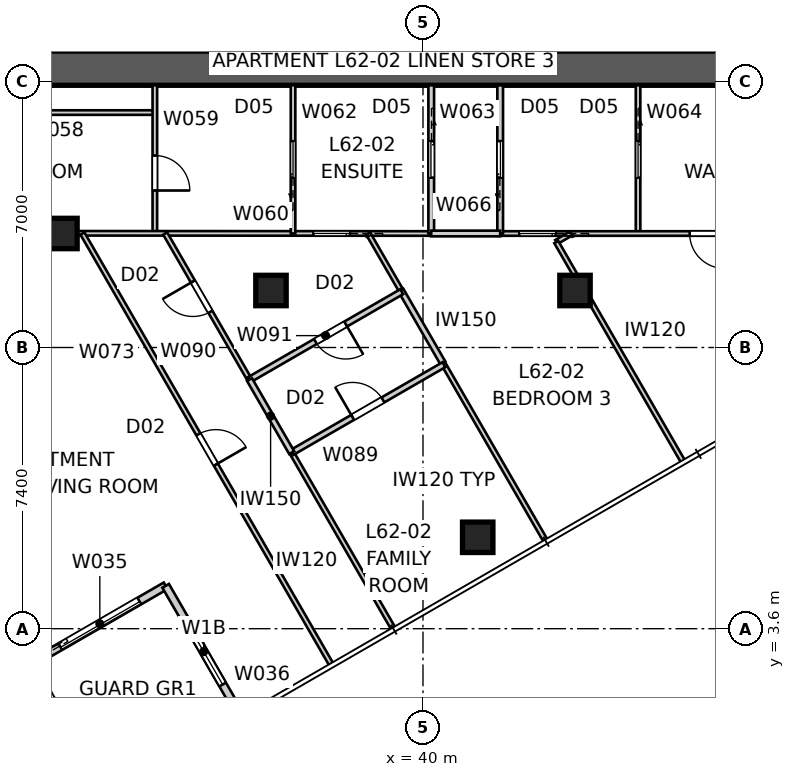
"""IFC4 building model, lengths in metres.
Left out: names, types, materials, properties, quantities, classifications, styles, units other than length and angle.
Written with IfcOpenShell. Run it as: python <this file> out.ifc"""

import sys

from ifc_helpers import new_model, si_unit, direction, frame, frame_2d, origin, origin_2d, place, context, subcontext, project, spatial, polyline, rectangle, outline, extrude, element, fill, save


model = new_model("IFC4")
c1 = context("Model", 3, precision=1e-05, world=origin(), true_north=direction((0.0, 1.0)))
c2 = subcontext(c1, "Body", "Model", "MODEL_VIEW")
j1 = project(units=[si_unit("LENGTHUNIT", "METRE"), si_unit("PLANEANGLEUNIT", "RADIAN")], contexts=[c1])
p1 = place(None, origin())
s1 = spatial("IfcSite", under=j1, at=p1, CompositionType="ELEMENT")
p2 = place(p1, origin())
s2 = spatial("IfcBuilding", under=s1, at=p2, CompositionType="ELEMENT")
p3 = place(p2, frame((0.0, 0.0, 225.2)))
s3 = spatial("IfcBuildingStorey", under=s2, at=p3, CompositionType="ELEMENT", Elevation=225.2)
p4 = place(p3, frame((51.2, 18.35, 0.0), z_axis=(0.0, 0.0, 1.0), x_axis=(-1.0, 0.0, 0.0)))
e1 = element("IfcWall", 1, at=p4, inside=s3, PredefinedType="SHEAR", context=c2, shape_type="SweptSolid", body=[
    extrude(outline(polyline([(0.0, -0.45), (22.4, -0.45), (22.4, -0.025), (22.85, -0.025), (22.85, 0.025), (22.4, 0.025), (22.4, 0.45), (0.0, 0.45), (0.0, 0.025), (-0.45, 0.025), (-0.45, -0.025), (0.0, -0.025), (0.0, -0.45)])), origin(), (0.0, 0.0, 1.0), 3.4),
])
for number, where, z_axis, x_axis in (
    (2, (41.44, 6.005, 0.0), (0.0, 0.0, 1.0), (1.0, 0.0, 0.0)),
    (3, (30.5, 14.0, 0.0), (0.0, 0.0, 1.0), (1.0, 0.0, 0.0)),
    (4, (36.0, 12.5, 0.0), (0.0, 0.0, 1.0), (1.0, 0.0, 0.0)),
    (5, (44.0, 12.5, 0.0), (0.0, 0.0, 1.0), (1.0, 0.0, 0.0)),
):
    element("IfcColumn", number, at=place(p3, frame(where, z_axis=z_axis, x_axis=x_axis)), inside=s3, PredefinedType="COLUMN", context=c2, shape_type="SweptSolid", body=[
        extrude(rectangle(XDim=0.8, YDim=0.8, at=origin_2d()), origin(), (0.0, 0.0, 1.0), 3.4),
    ])
p5 = place(p3, frame((29.764, 2.729, 0.0), z_axis=(0.0, 0.0, 1.0), x_axis=(0.866026010844, 0.49999894854, 0.0)))
e6 = element("IfcWall", 6, at=p5, inside=s3, PredefinedType="SOLIDWALL", context=c2, shape_type="SweptSolid", body=[
    extrude(rectangle(XDim=4.0, YDim=0.2, at=frame_2d((2.0, 0.0))), origin(), (0.0, 0.0, 1.0), 3.25),
])
p6 = place(p5, frame((0.8, 0.0, 0.0)))
e7 = element("IfcOpeningElement", 7, at=p6, cuts=e6, PredefinedType="OPENING", context=c2, shape_type="SweptSolid", body=[
    extrude(rectangle(XDim=2.4, YDim=2.1, at=frame_2d((1.2, 1.05))), frame((0.0, 0.11, 0.0), z_axis=(0.0, -1.0, 0.0), x_axis=(1.0, 0.0, 0.0)), (0.0, 0.0, 1.0), 0.22),
])
p7 = place(p3, frame((33.229, 4.729, 0.0), z_axis=(0.0, 0.0, 1.0), x_axis=(0.49999894854, -0.866026010844, 0.0)))
e8 = element("IfcWall", 8, at=p7, inside=s3, PredefinedType="SOLIDWALL", context=c2, shape_type="SweptSolid", body=[
    extrude(rectangle(XDim=4.0, YDim=0.2, at=frame_2d((2.0, 0.0))), origin(), (0.0, 0.0, 1.0), 3.25),
])
p8 = place(p7, frame((1.0, 0.0, 0.45)))
e9 = element("IfcOpeningElement", 9, at=p8, cuts=e8, PredefinedType="OPENING", context=c2, shape_type="SweptSolid", body=[
    extrude(rectangle(XDim=2.0, YDim=1.8, at=frame_2d((1.0, 0.9))), frame((0.0, 0.11, 0.0), z_axis=(0.0, -1.0, 0.0), x_axis=(1.0, 0.0, 0.0)), (0.0, 0.0, 1.0), 0.22),
])
p9 = place(p3, frame((32.944, 17.183, 0.0), z_axis=(0.0, 0.0, 1.0), x_axis=(-1.0, 0.0, 0.0)))
e10 = element("IfcWall", 10, at=p9, inside=s3, PredefinedType="PARTITIONING", context=c2, shape_type="SweptSolid", body=[
    extrude(rectangle(XDim=8.944, YDim=0.12, at=frame_2d((4.472, 0.0))), origin(), (0.0, 0.0, 1.0), 3.25),
])
p10 = place(p9, frame((5.192, 0.0, 0.0)))
e11 = element("IfcOpeningElement", 11, at=p10, cuts=e10, PredefinedType="OPENING", context=c2, shape_type="SweptSolid", body=[
    extrude(rectangle(XDim=0.96, YDim=2.1, at=frame_2d((0.48, 1.05))), frame((0.0, 0.07, 0.0), z_axis=(0.0, -1.0, 0.0), x_axis=(1.0, 0.0, 0.0)), (0.0, 0.0, 1.0), 0.14),
])
p11 = place(p3, frame((32.944, 17.9, 0.0), z_axis=(0.0, 0.0, 1.0), x_axis=(0.0, -1.0, 0.0)))
e12 = element("IfcWall", 12, at=p11, inside=s3, PredefinedType="PARTITIONING", context=c2, shape_type="SweptSolid", body=[
    extrude(rectangle(XDim=3.9, YDim=0.12, at=frame_2d((1.95, 0.0))), origin(), (0.0, 0.0, 1.0), 3.25),
])
p12 = place(p11, frame((1.849, 0.0, 0.0)))
e13 = element("IfcOpeningElement", 13, at=p12, cuts=e12, PredefinedType="OPENING", context=c2, shape_type="SweptSolid", body=[
    extrude(rectangle(XDim=0.92, YDim=2.34, at=frame_2d((0.46, 1.17))), frame((0.0, 0.07, 0.0), z_axis=(0.0, -1.0, 0.0), x_axis=(1.0, 0.0, 0.0)), (0.0, 0.0, 1.0), 0.14),
])
p13 = place(p3, frame((40.217, 14.0, 0.0), z_axis=(0.0, 0.0, 1.0), x_axis=(-0.999999825002, 0.000591604877, 0.0)))
e14 = element("IfcWall", 14, at=p13, inside=s3, PredefinedType="PARTITIONING", context=c2, shape_type="SweptSolid", body=[
    extrude(rectangle(XDim=16.92, YDim=0.12, at=frame_2d((8.46, 0.0))), origin(), (0.0, 0.0, 1.0), 2.55),
])
p14 = place(p13, frame((2.14, 0.0, 0.0)))
e15 = element("IfcOpeningElement", 15, at=p14, cuts=e14, PredefinedType="OPENING", context=c2, shape_type="SweptSolid", body=[
    extrude(rectangle(XDim=0.96, YDim=2.1, at=frame_2d((0.48, 1.05))), frame((0.0, 0.07, 0.0), z_axis=(0.0, -1.0, 0.0), x_axis=(1.0, 0.0, 0.0)), (0.0, 0.0, 1.0), 0.14),
])
p15 = place(p13, frame((12.313, 0.0, 0.0)))
e16 = element("IfcOpeningElement", 16, at=p15, cuts=e14, PredefinedType="OPENING", context=c2, shape_type="SweptSolid", body=[
    extrude(rectangle(XDim=0.92, YDim=2.34, at=frame_2d((0.46, 1.17))), frame((0.0, 0.07, 0.0), z_axis=(0.0, -1.0, 0.0), x_axis=(1.0, 0.0, 0.0)), (0.0, 0.0, 1.0), 0.14),
])
p16 = place(p3, frame((36.581, 14.0, 0.0), z_axis=(0.0, 0.0, 1.0), x_axis=(0.0, 1.0, 0.0)))
e17 = element("IfcWall", 17, at=p16, inside=s3, PredefinedType="PARTITIONING", context=c2, shape_type="SweptSolid", body=[
    extrude(rectangle(XDim=3.9, YDim=0.12, at=frame_2d((1.95, 0.0))), origin(), (0.0, 0.0, 1.0), 3.25),
])
p17 = place(p16, frame((1.47, 0.0, 0.0)))
e18 = element("IfcOpeningElement", 18, at=p17, cuts=e17, PredefinedType="OPENING", context=c2, shape_type="SweptSolid", body=[
    extrude(rectangle(XDim=0.96, YDim=2.1, at=frame_2d((0.48, 1.05))), frame((0.0, 0.07, 0.0), z_axis=(0.0, -1.0, 0.0), x_axis=(1.0, 0.0, 0.0)), (0.0, 0.0, 1.0), 0.14),
])
p18 = place(p3, frame((40.217, 17.9, 0.0), z_axis=(0.0, 0.0, 1.0), x_axis=(0.0, -1.0, 0.0)))
e19 = element("IfcWall", 19, at=p18, inside=s3, PredefinedType="SOLIDWALL", context=c2, shape_type="SweptSolid", body=[
    extrude(rectangle(XDim=3.9, YDim=0.15, at=frame_2d((1.95, 0.0))), origin(), (0.0, 0.0, 1.0), 3.25),
])
p19 = place(p18, frame((1.47, 0.0, 0.0)))
e20 = element("IfcOpeningElement", 20, at=p19, cuts=e19, PredefinedType="OPENING", context=c2, shape_type="SweptSolid", body=[
    extrude(rectangle(XDim=0.96, YDim=2.1, at=frame_2d((0.48, 1.05))), frame((0.0, 0.085, 0.0), z_axis=(0.0, -1.0, 0.0), x_axis=(1.0, 0.0, 0.0)), (0.0, 0.0, 1.0), 0.17),
])
p20 = place(p3, frame((45.659, 17.9, 0.0), z_axis=(0.0, 0.0, 1.0), x_axis=(0.0, -1.0, 0.0)))
e21 = element("IfcWall", 21, at=p20, inside=s3, PredefinedType="PARTITIONING", context=c2, shape_type="SweptSolid", body=[
    extrude(rectangle(XDim=3.9, YDim=0.12, at=frame_2d((1.95, 0.0))), origin(), (0.0, 0.0, 1.0), 3.25),
])
p21 = place(p20, frame((1.47, 0.0, 0.0)))
e22 = element("IfcOpeningElement", 22, at=p21, cuts=e21, PredefinedType="OPENING", context=c2, shape_type="SweptSolid", body=[
    extrude(rectangle(XDim=0.96, YDim=2.1, at=frame_2d((0.48, 1.05))), frame((0.0, 0.07, 0.0), z_axis=(0.0, -1.0, 0.0), x_axis=(1.0, 0.0, 0.0)), (0.0, 0.0, 1.0), 0.14),
])
p22 = place(p3, frame((51.757, 14.0, 0.0), z_axis=(0.0, 0.0, 1.0), x_axis=(-1.0, 0.0, 0.0)))
e23 = element("IfcWall", 23, at=p22, inside=s3, PredefinedType="PARTITIONING", context=c2, shape_type="SweptSolid", body=[
    extrude(rectangle(XDim=9.726, YDim=0.12, at=frame_2d((4.863, 0.0))), origin(), (0.0, 0.0, 1.0), 2.55),
])
p23 = place(p22, frame((3.82, 0.0, 0.0)))
e24 = element("IfcOpeningElement", 24, at=p23, cuts=e23, PredefinedType="OPENING", context=c2, shape_type="SweptSolid", body=[
    extrude(rectangle(XDim=0.92, YDim=2.34, at=frame_2d((0.46, 1.17))), frame((0.0, 0.07, 0.0), z_axis=(0.0, -1.0, 0.0), x_axis=(1.0, 0.0, 0.0)), (0.0, 0.0, 1.0), 0.14),
])
p24 = place(p22, frame((8.263, 0.0, 0.0)))
e25 = element("IfcOpeningElement", 25, at=p24, cuts=e23, PredefinedType="OPENING", context=c2, shape_type="SweptSolid", body=[
    extrude(rectangle(XDim=0.96, YDim=2.1, at=frame_2d((0.48, 1.05))), frame((0.0, 0.07, 0.0), z_axis=(0.0, -1.0, 0.0), x_axis=(1.0, 0.0, 0.0)), (0.0, 0.0, 1.0), 0.14),
])
p25 = place(p3, frame((42.031, 14.0, 0.0), z_axis=(0.0, 0.0, 1.0), x_axis=(0.0, 1.0, 0.0)))
e26 = element("IfcWall", 26, at=p25, inside=s3, PredefinedType="SOLIDWALL", context=c2, shape_type="SweptSolid", body=[
    extrude(rectangle(XDim=3.9, YDim=0.15, at=frame_2d((1.95, 0.0))), origin(), (0.0, 0.0, 1.0), 3.25),
])
p26 = place(p25, frame((1.47, 0.0, 0.0)))
e27 = element("IfcOpeningElement", 27, at=p26, cuts=e26, PredefinedType="OPENING", context=c2, shape_type="SweptSolid", body=[
    extrude(rectangle(XDim=0.96, YDim=2.1, at=frame_2d((0.48, 1.05))), frame((0.0, 0.085, 0.0), z_axis=(0.0, -1.0, 0.0), x_axis=(1.0, 0.0, 0.0)), (0.0, 0.0, 1.0), 0.17),
])
p27 = place(p3, frame((31.039, 14.0, 0.0), z_axis=(0.0, 0.0, 1.0), x_axis=(0.500006184843, -0.866021832934, 0.0)))
e28 = element("IfcWall", 28, at=p27, inside=s3, PredefinedType="PARTITIONING", context=c2, shape_type="SweptSolid", body=[
    extrude(rectangle(XDim=13.084, YDim=0.12, at=frame_2d((6.542, 0.0))), origin(), (0.0, 0.0, 1.0), 3.25),
])
p28 = place(p27, frame((6.102, 0.0, 0.0)))
e29 = element("IfcOpeningElement", 29, at=p28, cuts=e28, PredefinedType="OPENING", context=c2, shape_type="SweptSolid", body=[
    extrude(rectangle(XDim=0.92, YDim=2.34, at=frame_2d((0.46, 1.17))), frame((0.0, 0.07, 0.0), z_axis=(0.0, -1.0, 0.0), x_axis=(1.0, 0.0, 0.0)), (0.0, 0.0, 1.0), 0.14),
])
p29 = place(p3, frame((25.174, 10.759, 0.0), z_axis=(0.0, 0.0, 1.0), x_axis=(0.866023120914, 0.500003954026, 0.0)))
e30 = element("IfcWall", 30, at=p29, inside=s3, PredefinedType="PARTITIONING", context=c2, shape_type="SweptSolid", body=[
    extrude(rectangle(XDim=6.481, YDim=0.12, at=frame_2d((3.241, 0.0))), origin(), (0.0, 0.0, 1.0), 3.25),
])
p30 = place(p3, frame((43.219, 5.924, 0.0), z_axis=(0.0, 0.0, 1.0), x_axis=(-0.500003544594, 0.866023357302, 0.0)))
e31 = element("IfcWall", 31, at=p30, inside=s3, PredefinedType="PARTITIONING", context=c2, shape_type="SweptSolid", body=[
    extrude(rectangle(XDim=5.388, YDim=0.12, at=frame_2d((2.694, 0.0))), origin(), (0.0, 0.0, 1.0), 3.25),
])
p31 = place(p3, frame((43.897, 14.0, 0.0), z_axis=(0.0, 0.0, 1.0), x_axis=(-0.865896406789, -0.500223362819, 0.0)))
e32 = element("IfcWall", 32, at=p31, inside=s3, PredefinedType="PARTITIONING", context=c2, shape_type="SweptSolid", body=[
    extrude(rectangle(XDim=0.45, YDim=0.12, at=frame_2d((0.225, 0.0))), origin(), (0.0, 0.0, 1.0), 3.25),
])
p32 = place(p3, frame((43.507, 13.775, 0.0), z_axis=(0.0, 0.0, 1.0), x_axis=(0.500013541994, -0.866017585169, 0.0)))
e33 = element("IfcWall", 33, at=p32, inside=s3, PredefinedType="PARTITIONING", context=c2, shape_type="SweptSolid", body=[
    extrude(rectangle(XDim=6.655, YDim=0.12, at=frame_2d((3.328, 0.0))), origin(), (0.0, 0.0, 1.0), 3.25),
])
p33 = place(p3, frame((39.416, 12.512, 0.0), z_axis=(0.0, 0.0, 1.0), x_axis=(-0.500005339912, 0.866022320763, 0.0)))
e34 = element("IfcWall", 34, at=p33, inside=s3, PredefinedType="PARTITIONING", context=c2, shape_type="SweptSolid", body=[
    extrude(rectangle(XDim=1.718, YDim=0.12, at=frame_2d((0.859, 0.0))), origin(), (0.0, 0.0, 1.0), 3.25),
])
p34 = place(p3, frame((40.217, 14.0, 0.0), z_axis=(0.0, 0.0, 1.0), x_axis=(1.0, 0.0, 0.0)))
e35 = element("IfcWall", 35, at=p34, inside=s3, PredefinedType="SOLIDWALL", context=c2, shape_type="SweptSolid", body=[
    extrude(rectangle(XDim=1.814, YDim=0.15, at=frame_2d((0.907, 0.0))), origin(), (0.0, 0.0, 1.0), 3.25),
])
p35 = place(p3, frame((40.525, 10.59, 0.0), z_axis=(0.0, 0.0, 1.0), x_axis=(-0.499973265211, 0.866040838572, 0.0)))
e36 = element("IfcWall", 36, at=p35, inside=s3, PredefinedType="SOLIDWALL", context=c2, shape_type="SweptSolid", body=[
    extrude(rectangle(XDim=2.219, YDim=0.15, at=frame_2d((1.109, 0.0))), origin(), (0.0, 0.0, 1.0), 3.25),
])
p36 = place(p3, frame((39.214, 3.612, 0.0), z_axis=(0.0, 0.0, 1.0), x_axis=(-0.499995631649, 0.866027925839, 0.0)))
e37 = element("IfcWall", 37, at=p36, inside=s3, PredefinedType="PARTITIONING", context=c2, shape_type="SweptSolid", body=[
    extrude(rectangle(XDim=5.338, YDim=0.12, at=frame_2d((2.669, 0.0))), origin(), (0.0, 0.0, 1.0), 3.25),
])
p37 = place(p3, frame((36.545, 8.234, 0.0), z_axis=(0.0, 0.0, 1.0), x_axis=(0.866025598446, 0.499999662836, 0.0)))
e38 = element("IfcWall", 38, at=p37, inside=s3, PredefinedType="SOLIDWALL", context=c2, shape_type="SweptSolid", body=[
    extrude(rectangle(XDim=4.625, YDim=0.15, at=frame_2d((2.312, 0.0))), origin(), (0.0, 0.0, 1.0), 3.25),
])
p38 = place(p37, frame((1.853, 0.0, 0.0)))
e39 = element("IfcOpeningElement", 39, at=p38, cuts=e38, PredefinedType="OPENING", context=c2, shape_type="SweptSolid", body=[
    extrude(rectangle(XDim=0.92, YDim=2.34, at=frame_2d((0.46, 1.17))), frame((0.0, 0.085, 0.0), z_axis=(0.0, -1.0, 0.0), x_axis=(1.0, 0.0, 0.0)), (0.0, 0.0, 1.0), 0.17),
])
p39 = place(p3, frame((35.435, 10.156, 0.0), z_axis=(0.0, 0.0, 1.0), x_axis=(-0.499966886051, 0.866044521288, 0.0)))
e40 = element("IfcWall", 40, at=p39, inside=s3, PredefinedType="PARTITIONING", context=c2, shape_type="SweptSolid", body=[
    extrude(rectangle(XDim=4.438, YDim=0.12, at=frame_2d((2.219, 0.0))), origin(), (0.0, 0.0, 1.0), 3.25),
])
p40 = place(p39, frame((2.059, 0.0, 0.0)))
e41 = element("IfcOpeningElement", 41, at=p40, cuts=e40, PredefinedType="OPENING", context=c2, shape_type="SweptSolid", body=[
    extrude(rectangle(XDim=0.92, YDim=2.34, at=frame_2d((0.46, 1.17))), frame((0.0, 0.07, 0.0), z_axis=(0.0, -1.0, 0.0), x_axis=(1.0, 0.0, 0.0)), (0.0, 0.0, 1.0), 0.14),
])
p41 = place(p3, frame((39.441, 12.469, 0.0), z_axis=(0.0, 0.0, 1.0), x_axis=(-0.866025598446, -0.499999662836, 0.0)))
e42 = element("IfcWall", 42, at=p41, inside=s3, PredefinedType="SOLIDWALL", context=c2, shape_type="SweptSolid", body=[
    extrude(rectangle(XDim=4.625, YDim=0.15, at=frame_2d((2.312, 0.0))), origin(), (0.0, 0.0, 1.0), 3.25),
])
p42 = place(p41, frame((1.702, 0.0, 0.0)))
e43 = element("IfcOpeningElement", 43, at=p42, cuts=e42, PredefinedType="OPENING", context=c2, shape_type="SweptSolid", body=[
    extrude(rectangle(XDim=0.92, YDim=2.34, at=frame_2d((0.46, 1.17))), frame((0.0, 0.085, 0.0), z_axis=(0.0, -1.0, 0.0), x_axis=(1.0, 0.0, 0.0)), (0.0, 0.0, 1.0), 0.17),
])
p43 = place(p3, frame((35.435, 10.156, 0.0), z_axis=(0.0, 0.0, 1.0), x_axis=(0.500008142102, -0.866020702889, 0.0)))
e44 = element("IfcWall", 44, at=p43, inside=s3, PredefinedType="SOLIDWALL", context=c2, shape_type="SweptSolid", body=[
    extrude(rectangle(XDim=2.219, YDim=0.15, at=frame_2d((1.11, 0.0))), origin(), (0.0, 0.0, 1.0), 3.25),
])
p44 = place(p6, origin())
e45 = element("IfcDoor", 45, at=p44, inside=s3, OperationType="SLIDING_TO_LEFT", PredefinedType="DOOR", context=c2, shape_type="SweptSolid", body=[
    extrude(rectangle(XDim=2.4, YDim=2.1, at=frame_2d((1.2, 1.05))), frame((0.0, 0.025, 0.0), z_axis=(0.0, -1.0, 0.0), x_axis=(1.0, 0.0, 0.0)), (0.0, 0.0, 1.0), 0.05),
])
fill(e7, e45)
p45 = place(p8, origin())
e46 = element("IfcWindow", 46, at=p45, inside=s3, PartitioningType="SINGLE_PANEL", PredefinedType="WINDOW", context=c2, shape_type="SweptSolid", body=[
    extrude(rectangle(XDim=2.0, YDim=1.8, at=frame_2d((1.0, 0.9))), frame((0.0, 0.03, 0.0), z_axis=(0.0, -1.0, 0.0), x_axis=(1.0, 0.0, 0.0)), (0.0, 0.0, 1.0), 0.06),
])
fill(e9, e46)
p46 = place(p21, origin())
e47 = element("IfcDoor", 47, at=p46, inside=s3, OperationType="SLIDING_TO_LEFT", PredefinedType="DOOR", context=c2, shape_type="SweptSolid", body=[
    extrude(rectangle(XDim=0.96, YDim=2.1, at=frame_2d((0.48, 1.05))), frame((0.0, 0.025, 0.0), z_axis=(0.0, -1.0, 0.0), x_axis=(1.0, 0.0, 0.0)), (0.0, 0.0, 1.0), 0.05),
])
fill(e22, e47)
p47 = place(p23, origin())
e48 = element("IfcDoor", 48, at=p47, inside=s3, OperationType="SINGLE_SWING_LEFT", PredefinedType="DOOR", context=c2, shape_type="SweptSolid", body=[
    extrude(rectangle(XDim=0.92, YDim=2.34, at=frame_2d((0.46, 1.17))), frame((0.0, 0.025, 0.0), z_axis=(0.0, -1.0, 0.0), x_axis=(1.0, 0.0, 0.0)), (0.0, 0.0, 1.0), 0.05),
])
fill(e24, e48)
p48 = place(p26, origin())
e49 = element("IfcDoor", 49, at=p48, inside=s3, OperationType="SLIDING_TO_LEFT", PredefinedType="DOOR", context=c2, shape_type="SweptSolid", body=[
    extrude(rectangle(XDim=0.96, YDim=2.1, at=frame_2d((0.48, 1.05))), frame((0.0, 0.025, 0.0), z_axis=(0.0, -1.0, 0.0), x_axis=(1.0, 0.0, 0.0)), (0.0, 0.0, 1.0), 0.05),
])
fill(e27, e49)
p49 = place(p24, origin())
e50 = element("IfcDoor", 50, at=p49, inside=s3, OperationType="SLIDING_TO_LEFT", PredefinedType="DOOR", context=c2, shape_type="SweptSolid", body=[
    extrude(rectangle(XDim=0.96, YDim=2.1, at=frame_2d((0.48, 1.05))), frame((0.0, 0.025, 0.0), z_axis=(0.0, -1.0, 0.0), x_axis=(1.0, 0.0, 0.0)), (0.0, 0.0, 1.0), 0.05),
])
fill(e25, e50)
p50 = place(p19, origin())
e51 = element("IfcDoor", 51, at=p50, inside=s3, OperationType="SLIDING_TO_LEFT", PredefinedType="DOOR", context=c2, shape_type="SweptSolid", body=[
    extrude(rectangle(XDim=0.96, YDim=2.1, at=frame_2d((0.48, 1.05))), frame((0.0, 0.025, 0.0), z_axis=(0.0, -1.0, 0.0), x_axis=(1.0, 0.0, 0.0)), (0.0, 0.0, 1.0), 0.05),
])
fill(e20, e51)
p51 = place(p17, origin())
e52 = element("IfcDoor", 52, at=p51, inside=s3, OperationType="SLIDING_TO_LEFT", PredefinedType="DOOR", context=c2, shape_type="SweptSolid", body=[
    extrude(rectangle(XDim=0.96, YDim=2.1, at=frame_2d((0.48, 1.05))), frame((0.0, 0.025, 0.0), z_axis=(0.0, -1.0, 0.0), x_axis=(1.0, 0.0, 0.0)), (0.0, 0.0, 1.0), 0.05),
])
fill(e18, e52)
p52 = place(p14, origin())
e53 = element("IfcDoor", 53, at=p52, inside=s3, OperationType="SLIDING_TO_LEFT", PredefinedType="DOOR", context=c2, shape_type="SweptSolid", body=[
    extrude(rectangle(XDim=0.96, YDim=2.1, at=frame_2d((0.48, 1.05))), frame((0.0, 0.025, 0.0), z_axis=(0.0, -1.0, 0.0), x_axis=(1.0, 0.0, 0.0)), (0.0, 0.0, 1.0), 0.05),
])
fill(e15, e53)
p53 = place(p12, origin())
e54 = element("IfcDoor", 54, at=p53, inside=s3, OperationType="SINGLE_SWING_RIGHT", PredefinedType="DOOR", context=c2, shape_type="SweptSolid", body=[
    extrude(rectangle(XDim=0.92, YDim=2.34, at=frame_2d((0.46, 1.17))), frame((0.0, 0.025, 0.0), z_axis=(0.0, -1.0, 0.0), x_axis=(1.0, 0.0, 0.0)), (0.0, 0.0, 1.0), 0.05),
])
fill(e13, e54)
p54 = place(p42, origin())
e55 = element("IfcDoor", 55, at=p54, inside=s3, OperationType="SINGLE_SWING_LEFT", PredefinedType="DOOR", context=c2, shape_type="SweptSolid", body=[
    extrude(rectangle(XDim=0.92, YDim=2.34, at=frame_2d((0.46, 1.17))), frame((0.0, 0.025, 0.0), z_axis=(0.0, -1.0, 0.0), x_axis=(1.0, 0.0, 0.0)), (0.0, 0.0, 1.0), 0.05),
])
fill(e43, e55)
p55 = place(p40, origin())
e56 = element("IfcDoor", 56, at=p55, inside=s3, OperationType="SINGLE_SWING_RIGHT", PredefinedType="DOOR", context=c2, shape_type="SweptSolid", body=[
    extrude(rectangle(XDim=0.92, YDim=2.34, at=frame_2d((0.46, 1.17))), frame((0.0, 0.025, 0.0), z_axis=(0.0, -1.0, 0.0), x_axis=(1.0, 0.0, 0.0)), (0.0, 0.0, 1.0), 0.05),
])
fill(e41, e56)
p56 = place(p38, origin())
e57 = element("IfcDoor", 57, at=p56, inside=s3, OperationType="SINGLE_SWING_LEFT", PredefinedType="DOOR", context=c2, shape_type="SweptSolid", body=[
    extrude(rectangle(XDim=0.92, YDim=2.34, at=frame_2d((0.46, 1.17))), frame((0.0, 0.025, 0.0), z_axis=(0.0, -1.0, 0.0), x_axis=(1.0, 0.0, 0.0)), (0.0, 0.0, 1.0), 0.05),
])
fill(e39, e57)
p57 = place(p28, origin())
e58 = element("IfcDoor", 58, at=p57, inside=s3, OperationType="SINGLE_SWING_RIGHT", PredefinedType="DOOR", context=c2, shape_type="SweptSolid", body=[
    extrude(rectangle(XDim=0.92, YDim=2.34, at=frame_2d((0.46, 1.17))), frame((0.0, 0.025, 0.0), z_axis=(0.0, -1.0, 0.0), x_axis=(1.0, 0.0, 0.0)), (0.0, 0.0, 1.0), 0.05),
])
fill(e29, e58)
save(model, sys.argv[1])
